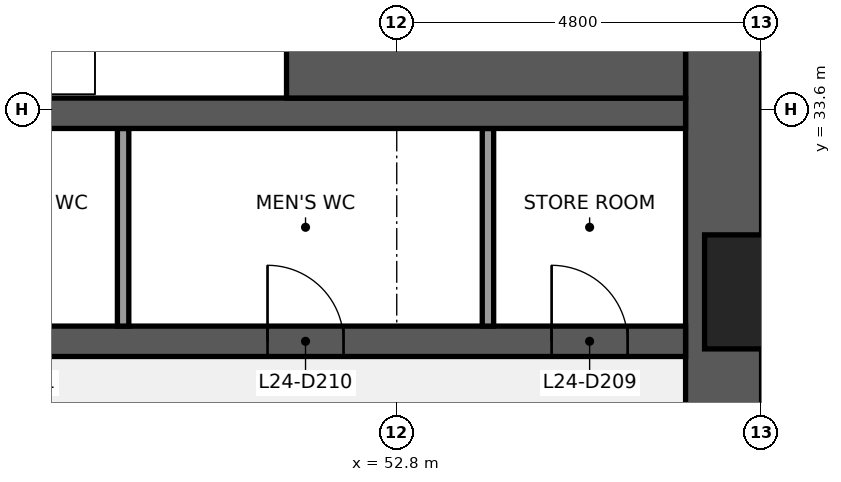
"""IFC4 building model, lengths in metres.
Left out: names, types, materials, properties, quantities, classifications, styles, units other than length and angle.
Written with IfcOpenShell. Run it as: python <this file> out.ifc"""

import sys

from ifc_helpers import new_model, si_unit, direction, frame, frame_2d, origin, place, context, subcontext, project, spatial, rectangle, extrude, element, fill, save


model = new_model("IFC4")
c1 = context("Model", 3, precision=1e-05, world=origin(), true_north=direction((0.0, 1.0)))
c2 = subcontext(c1, "Body", "Model", "MODEL_VIEW")
j1 = project(units=[si_unit("LENGTHUNIT", "METRE"), si_unit("PLANEANGLEUNIT", "RADIAN")], contexts=[c1])
p1 = place(None, origin())
s1 = spatial("IfcSite", under=j1, at=p1, CompositionType="ELEMENT")
p2 = place(p1, origin())
s2 = spatial("IfcBuilding", under=s1, at=p2, CompositionType="ELEMENT")
p3 = place(p2, frame((0.0, 0.0, 116.1)))
s3 = spatial("IfcBuildingStorey", under=s2, at=p3, CompositionType="ELEMENT", Elevation=116.1)
p4 = place(p3, frame((57.1, 38.4, 0.0), z_axis=(0.0, 0.0, 1.0), x_axis=(0.0, -1.0, 0.0)))
e1 = element("IfcWall", 1, at=p4, inside=s3, PredefinedType="SHEAR", context=c2, shape_type="SweptSolid", body=[
    extrude(rectangle(XDim=28.8, YDim=1.0, at=frame_2d((14.4, 0.0))), origin(), (0.0, 0.0, 1.0), 3.84),
])
p5 = place(p4, frame((18.45, 0.0, 0.9)))
e2 = element("IfcOpeningElement", 2, at=p5, cuts=e1, PredefinedType="OPENING", context=c2, shape_type="SweptSolid", body=[
    extrude(rectangle(XDim=1.5, YDim=1.5, at=frame_2d((0.75, 0.75))), frame((0.0, 0.51, 0.0), z_axis=(0.0, -1.0, 0.0), x_axis=(1.0, 0.0, 0.0)), (0.0, 0.0, 1.0), 1.02),
])
p6 = place(p4, frame((8.85, 0.0, 0.9)))
e3 = element("IfcOpeningElement", 3, at=p6, cuts=e1, PredefinedType="OPENING", context=c2, shape_type="SweptSolid", body=[
    extrude(rectangle(XDim=1.5, YDim=1.5, at=frame_2d((0.75, 0.75))), frame((0.0, 0.51, 0.0), z_axis=(0.0, -1.0, 0.0), x_axis=(1.0, 0.0, 0.0)), (0.0, 0.0, 1.0), 1.02),
])
p7 = place(p3, frame((39.4, 30.55, 0.0), z_axis=(0.0, 0.0, 1.0), x_axis=(1.0, 0.0, 0.0)))
e4 = element("IfcWall", 4, at=p7, inside=s3, PredefinedType="SHEAR", context=c2, shape_type="SweptSolid", body=[
    extrude(rectangle(XDim=17.2, YDim=0.4, at=frame_2d((8.6, 0.0))), origin(), (0.0, 0.0, 1.0), 3.84),
])
p8 = place(p7, frame((15.438, 0.0, 0.0)))
e5 = element("IfcOpeningElement", 5, at=p8, cuts=e4, PredefinedType="OPENING", context=c2, shape_type="SweptSolid", body=[
    extrude(rectangle(XDim=1.0, YDim=2.1, at=frame_2d((0.5, 1.05))), frame((0.0, 0.21, 0.0), z_axis=(0.0, -1.0, 0.0), x_axis=(1.0, 0.0, 0.0)), (0.0, 0.0, 1.0), 0.42),
])
p9 = place(p7, frame((11.7, 0.0, 0.0)))
e6 = element("IfcOpeningElement", 6, at=p9, cuts=e4, PredefinedType="OPENING", context=c2, shape_type="SweptSolid", body=[
    extrude(rectangle(XDim=1.0, YDim=2.1, at=frame_2d((0.5, 1.05))), frame((0.0, 0.21, 0.0), z_axis=(0.0, -1.0, 0.0), x_axis=(1.0, 0.0, 0.0)), (0.0, 0.0, 1.0), 0.42),
])
p10 = place(p7, frame((7.8, 0.0, 0.0)))
e7 = element("IfcOpeningElement", 7, at=p10, cuts=e4, PredefinedType="OPENING", context=c2, shape_type="SweptSolid", body=[
    extrude(rectangle(XDim=1.0, YDim=2.1, at=frame_2d((0.5, 1.05))), frame((0.0, 0.21, 0.0), z_axis=(0.0, -1.0, 0.0), x_axis=(1.0, 0.0, 0.0)), (0.0, 0.0, 1.0), 0.42),
])
p11 = place(p7, frame((4.8, 0.0, 0.0)))
e8 = element("IfcOpeningElement", 8, at=p11, cuts=e4, PredefinedType="OPENING", context=c2, shape_type="SweptSolid", body=[
    extrude(rectangle(XDim=1.0, YDim=2.1, at=frame_2d((0.5, 1.05))), frame((0.0, 0.21, 0.0), z_axis=(0.0, -1.0, 0.0), x_axis=(1.0, 0.0, 0.0)), (0.0, 0.0, 1.0), 0.42),
])
p12 = place(p7, frame((1.363, 0.0, 0.0)))
e9 = element("IfcOpeningElement", 9, at=p12, cuts=e4, PredefinedType="OPENING", context=c2, shape_type="SweptSolid", body=[
    extrude(rectangle(XDim=1.0, YDim=2.1, at=frame_2d((0.5, 1.05))), frame((0.0, 0.21, 0.0), z_axis=(0.0, -1.0, 0.0), x_axis=(1.0, 0.0, 0.0)), (0.0, 0.0, 1.0), 0.42),
])
for number, where, z_axis, x_axis in (
    (10, (54.0, 30.75, 0.0), (0.0, 0.0, 1.0), (0.0, 1.0, 0.0)),
    (11, (49.2, 30.75, 0.0), (0.0, 0.0, 1.0), (0.0, 1.0, 0.0)),
):
    element("IfcWall", number, at=place(p3, frame(where, z_axis=z_axis, x_axis=x_axis)), inside=s3, PredefinedType="PARTITIONING", context=c2, shape_type="SweptSolid", body=[
        extrude(rectangle(XDim=2.6, YDim=0.15, at=frame_2d((1.3, 0.0))), origin(), (0.0, 0.0, 1.0), 3.84),
    ])
p13 = place(p3, frame((39.4, 33.55, 0.0), z_axis=(0.0, 0.0, 1.0), x_axis=(1.0, 0.0, 0.0)))
e12 = element("IfcWall", 12, at=p13, inside=s3, PredefinedType="SHEAR", context=c2, shape_type="SweptSolid", body=[
    extrude(rectangle(XDim=17.2, YDim=0.4, at=frame_2d((8.6, 0.0))), origin(), (0.0, 0.0, 1.0), 3.84),
])
p14 = place(p3, frame((51.35, 35.575, 0.0), z_axis=(0.0, 0.0, 1.0), x_axis=(1.0, 0.0, 0.0)))
e13 = element("IfcWall", 13, at=p14, inside=s3, PredefinedType="SHEAR", context=c2, shape_type="SweptSolid", body=[
    extrude(rectangle(XDim=5.25, YDim=3.65, at=frame_2d((2.625, 0.0))), origin(), (0.0, 0.0, 1.0), 3.84),
])
p15 = place(p8, origin())
e14 = element("IfcDoor", 14, at=p15, inside=s3, OperationType="SINGLE_SWING_LEFT", PredefinedType="DOOR", context=c2, shape_type="SweptSolid", body=[
    extrude(rectangle(XDim=1.0, YDim=2.1, at=frame_2d((0.5, 1.05))), frame((0.0, 0.025, 0.0), z_axis=(0.0, -1.0, 0.0), x_axis=(1.0, 0.0, 0.0)), (0.0, 0.0, 1.0), 0.05),
])
fill(e5, e14)
p16 = place(p9, origin())
e15 = element("IfcDoor", 15, at=p16, inside=s3, OperationType="SINGLE_SWING_LEFT", PredefinedType="DOOR", context=c2, shape_type="SweptSolid", body=[
    extrude(rectangle(XDim=1.0, YDim=2.1, at=frame_2d((0.5, 1.05))), frame((0.0, 0.025, 0.0), z_axis=(0.0, -1.0, 0.0), x_axis=(1.0, 0.0, 0.0)), (0.0, 0.0, 1.0), 0.05),
])
fill(e6, e15)
save(model, sys.argv[1])
